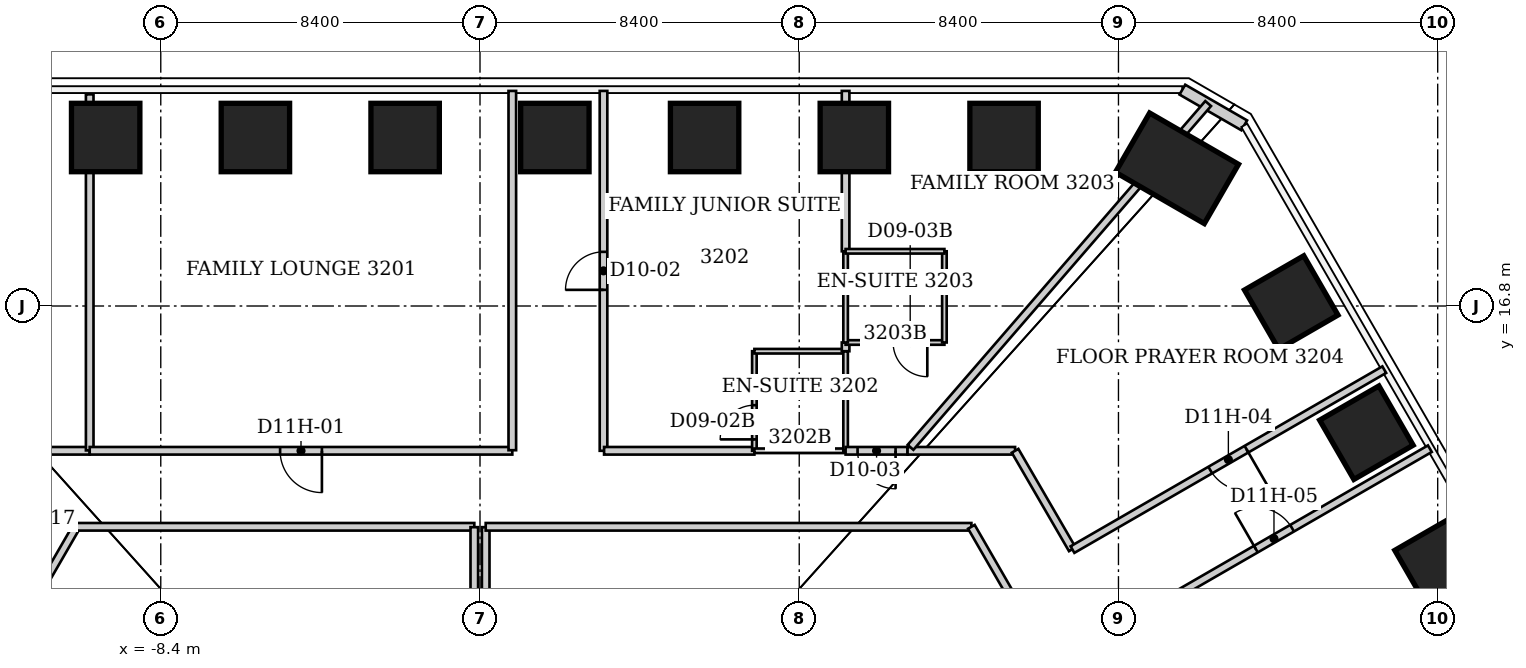
"""IFC4 building model, lengths in metres.
Left out: names, types, materials, properties, quantities, classifications, styles, units other than length and angle.
Written with IfcOpenShell. Run it as: python <this file> out.ifc"""

import sys

from ifc_helpers import new_model, si_unit, direction, frame, frame_2d, origin, origin_2d, place, context, subcontext, project, spatial, rectangle, extrude, element, fill, save


model = new_model("IFC4")
c1 = context("Model", 3, precision=1e-05, world=origin(), true_north=direction((0.0, 1.0)))
c2 = subcontext(c1, "Body", "Model", "MODEL_VIEW")
j1 = project(units=[si_unit("LENGTHUNIT", "METRE"), si_unit("PLANEANGLEUNIT", "RADIAN")], contexts=[c1])
p1 = place(None, origin())
s1 = spatial("IfcSite", under=j1, at=p1, CompositionType="ELEMENT")
p2 = place(p1, origin())
s2 = spatial("IfcBuilding", under=s1, at=p2, CompositionType="ELEMENT")
p3 = place(p2, frame((0.0, 0.0, 131.0)))
s3 = spatial("IfcBuildingStorey", under=s2, at=p3, CompositionType="ELEMENT", Elevation=131.0)
for number, where, z_axis, x_axis in (
    (1, (-9.85, 21.234, 0.0), (0.0, 0.0, 1.0), (0.0, 1.0, 0.0)),
    (2, (-5.91, 21.234, 0.0), (0.0, 0.0, 1.0), (0.0, 1.0, 0.0)),
    (3, (-1.97, 21.234, 0.0), (0.0, 0.0, 1.0), (0.0, 1.0, 0.0)),
    (4, (1.97, 21.234, 0.0), (0.0, 0.0, 1.0), (0.0, 1.0, 0.0)),
    (5, (5.91, 21.234, 0.0), (0.0, 0.0, 1.0), (0.0, 1.0, 0.0)),
    (6, (9.85, 21.234, 0.0), (0.0, 0.0, 1.0), (0.0, 1.0, 0.0)),
    (7, (13.79, 21.234, 0.0), (0.0, 0.0, 1.0), (0.0, 1.0, 0.0)),
):
    element("IfcColumn", number, at=place(p3, frame(where, z_axis=z_axis, x_axis=x_axis)), inside=s3, PredefinedType="COLUMN", context=c2, shape_type="SweptSolid", body=[
        extrude(rectangle(XDim=1.8, YDim=1.8, at=origin_2d()), origin(), (0.0, 0.0, 1.0), 3.8),
    ])
p4 = place(p3, frame((18.339, 20.424, 0.0), z_axis=(0.0, 0.0, 1.0), x_axis=(0.5, 0.866025403784, 0.0)))
e8 = element("IfcColumn", 8, at=p4, inside=s3, PredefinedType="COLUMN", context=c2, shape_type="SweptSolid", body=[
    extrude(rectangle(XDim=1.8, YDim=2.7, at=origin_2d()), origin(), (0.0, 0.0, 1.0), 3.8),
])
for number, where, z_axis, x_axis in (
    (9, (21.346, 16.891, 0.0), (0.0, 0.0, 1.0), (0.866, 0.5, 0.0)),
    (10, (23.324, 13.466, 0.0), (0.0, 0.0, 1.0), (0.866, 0.5, 0.0)),
    (11, (25.302, 10.041, 0.0), (0.0, 0.0, 1.0), (0.866, 0.5, 0.0)),
):
    element("IfcColumn", number, at=place(p3, frame(where, z_axis=z_axis, x_axis=x_axis)), inside=s3, PredefinedType="COLUMN", context=c2, shape_type="SweptSolid", body=[
        extrude(rectangle(XDim=1.8, YDim=1.8, at=origin_2d()), origin(), (0.0, 0.0, 1.0), 3.8),
    ])
p5 = place(p3, frame((18.481, 22.494, 0.0), z_axis=(0.0, 0.0, 1.0), x_axis=(0.865988793993, -0.500063404658, 0.0)))
e12 = element("IfcWall", 12, at=p5, inside=s3, PredefinedType="SOLIDWALL", context=c2, shape_type="SweptSolid", body=[
    extrude(rectangle(XDim=1.88, YDim=0.3, at=frame_2d((0.94, 0.0))), origin(), (0.0, 0.0, 1.0), 3.64),
])
p6 = place(p3, frame((-15.41, 2.7, 0.0), z_axis=(0.0, 0.0, 1.0), x_axis=(0.500296290322, 0.865854272894, 0.0)))
e13 = element("IfcWall", 13, at=p6, inside=s3, PredefinedType="PARTITIONING", context=c2, shape_type="SweptSolid", body=[
    extrude(rectangle(XDim=9.574, YDim=0.2, at=frame_2d((4.787, 0.0))), origin(), (0.0, 0.0, 1.0), 3.64),
])
p7 = place(p3, frame((-10.62, 10.99, 0.0), z_axis=(0.0, 0.0, 1.0), x_axis=(1.0, 0.0, 0.0)))
e14 = element("IfcWall", 14, at=p7, inside=s3, PredefinedType="PARTITIONING", context=c2, shape_type="SweptSolid", body=[
    extrude(rectangle(XDim=10.47, YDim=0.2, at=frame_2d((5.235, 0.0))), origin(), (0.0, 0.0, 1.0), 3.64),
])
p8 = place(p3, frame((-10.27, 12.99, 0.0), z_axis=(0.0, 0.0, 1.0), x_axis=(-1.0, 0.0, 0.0)))
e15 = element("IfcWall", 15, at=p8, inside=s3, PredefinedType="PARTITIONING", context=c2, shape_type="SweptSolid", body=[
    extrude(rectangle(XDim=1.5, YDim=0.2, at=frame_2d((0.75, 0.0))), origin(), (0.0, 0.0, 1.0), 3.64),
])
p9 = place(p3, frame((-10.27, 13.0, 0.0), z_axis=(0.0, 0.0, 1.0), x_axis=(0.0, 1.0, 0.0)))
e16 = element("IfcWall", 16, at=p9, inside=s3, PredefinedType="PARTITIONING", context=c2, shape_type="SweptSolid", body=[
    extrude(rectangle(XDim=9.37, YDim=0.2, at=frame_2d((4.685, 0.0))), origin(), (0.0, 0.0, 1.0), 3.64),
])
for number, where, z_axis, x_axis in (
    (17, (-0.15, 10.98, 0.0), (0.0, 0.0, 1.0), (0.0, -1.0, 0.0)),
    (18, (0.15, 9.21, 0.0), (0.0, 0.0, 1.0), (0.0, 1.0, 0.0)),
):
    element("IfcWall", number, at=place(p3, frame(where, z_axis=z_axis, x_axis=x_axis)), inside=s3, PredefinedType="PARTITIONING", context=c2, shape_type="SweptSolid", body=[
        extrude(rectangle(XDim=1.77, YDim=0.2, at=frame_2d((0.885, 0.0))), origin(), (0.0, 0.0, 1.0), 3.64),
    ])
p10 = place(p3, frame((0.15, 10.99, 0.0), z_axis=(0.0, 0.0, 1.0), x_axis=(1.0, 0.0, 0.0)))
e19 = element("IfcWall", 19, at=p10, inside=s3, PredefinedType="PARTITIONING", context=c2, shape_type="SweptSolid", body=[
    extrude(rectangle(XDim=12.78, YDim=0.2, at=frame_2d((6.39, 0.0))), origin(), (0.0, 0.0, 1.0), 3.64),
])
p11 = place(p3, frame((0.85, 12.99, 0.0), z_axis=(0.0, 0.0, 1.0), x_axis=(-1.0, 0.0, 0.0)))
e20 = element("IfcWall", 20, at=p11, inside=s3, PredefinedType="PARTITIONING", context=c2, shape_type="SweptSolid", body=[
    extrude(rectangle(XDim=11.12, YDim=0.2, at=frame_2d((5.56, 0.0))), origin(), (0.0, 0.0, 1.0), 3.64),
])
p12 = place(p11, frame((5.01, 0.0, 0.0)))
e21 = element("IfcOpeningElement", 21, at=p12, cuts=e20, PredefinedType="OPENING", context=c2, shape_type="SweptSolid", body=[
    extrude(rectangle(XDim=1.1, YDim=2.2, at=frame_2d((0.55, 1.1))), frame((0.0, 0.1, 0.0), z_axis=(0.0, -1.0, 0.0), x_axis=(1.0, 0.0, 0.0)), (0.0, 0.0, 1.0), 0.2),
])
p13 = place(p3, frame((0.85, 22.46, 0.0), z_axis=(0.0, 0.0, 1.0), x_axis=(0.0, -1.0, 0.0)))
e22 = element("IfcWall", 22, at=p13, inside=s3, PredefinedType="PARTITIONING", context=c2, shape_type="SweptSolid", body=[
    extrude(rectangle(XDim=9.455, YDim=0.2, at=frame_2d((4.728, 0.0))), origin(), (0.0, 0.0, 1.0), 3.64),
])
p14 = place(p3, frame((3.25, 12.99, 0.0), z_axis=(0.0, 0.0, 1.0), x_axis=(0.0, 1.0, 0.0)))
e23 = element("IfcWall", 23, at=p14, inside=s3, PredefinedType="PARTITIONING", context=c2, shape_type="SweptSolid", body=[
    extrude(rectangle(XDim=9.47, YDim=0.2, at=frame_2d((4.735, 0.0))), origin(), (0.0, 0.0, 1.0), 3.64),
])
p15 = place(p14, frame((4.235, 0.0, 0.0)))
e24 = element("IfcOpeningElement", 24, at=p15, cuts=e23, PredefinedType="OPENING", context=c2, shape_type="SweptSolid", body=[
    extrude(rectangle(XDim=1.0, YDim=2.13, at=frame_2d((0.5, 1.065))), frame((0.0, 0.1, 0.0), z_axis=(0.0, -1.0, 0.0), x_axis=(1.0, 0.0, 0.0)), (0.0, 0.0, 1.0), 0.2),
])
p16 = place(p3, frame((7.22, 12.99, 0.0), z_axis=(0.0, 0.0, 1.0), x_axis=(-1.0, 0.0, 0.0)))
e25 = element("IfcWall", 25, at=p16, inside=s3, PredefinedType="PARTITIONING", context=c2, shape_type="SweptSolid", body=[
    extrude(rectangle(XDim=3.955, YDim=0.2, at=frame_2d((1.978, 0.0))), origin(), (0.0, 0.0, 1.0), 3.64),
])
p17 = place(p3, frame((7.22, 15.61, 0.0), z_axis=(0.0, 0.0, 1.0), x_axis=(0.0, -1.0, 0.0)))
e26 = element("IfcWall", 26, at=p17, inside=s3, PredefinedType="PARTITIONING", context=c2, shape_type="SweptSolid", body=[
    extrude(rectangle(XDim=2.62, YDim=0.12, at=frame_2d((1.31, 0.0))), origin(), (0.0, 0.0, 1.0), 3.64),
])
p18 = place(p17, frame((1.42, 0.0, 0.0)))
e27 = element("IfcOpeningElement", 27, at=p18, cuts=e26, PredefinedType="OPENING", context=c2, shape_type="SweptSolid", body=[
    extrude(rectangle(XDim=0.9, YDim=2.03, at=frame_2d((0.45, 1.015))), frame((0.0, 0.06, 0.0), z_axis=(0.0, -1.0, 0.0), x_axis=(1.0, 0.0, 0.0)), (0.0, 0.0, 1.0), 0.12),
])
for number, where, z_axis, x_axis in (
    (28, (9.62, 12.99, 0.0), (0.0, 0.0, 1.0), (-1.0, 0.0, 0.0)),
    (29, (9.62, 15.61, 0.0), (0.0, 0.0, 1.0), (-1.0, 0.0, 0.0)),
):
    element("IfcWall", number, at=place(p3, frame(where, z_axis=z_axis, x_axis=x_axis)), inside=s3, PredefinedType="PARTITIONING", context=c2, shape_type="SweptSolid", body=[
        extrude(rectangle(XDim=2.4, YDim=0.12, at=frame_2d((1.2, 0.0))), origin(), (0.0, 0.0, 1.0), 3.64),
    ])
p19 = place(p3, frame((9.62, 15.61, 0.0), z_axis=(0.0, 0.0, 1.0), x_axis=(0.0, -1.0, 0.0)))
e30 = element("IfcWall", 30, at=p19, inside=s3, PredefinedType="PARTITIONING", context=c2, shape_type="SweptSolid", body=[
    extrude(rectangle(XDim=2.62, YDim=0.12, at=frame_2d((1.31, 0.0))), origin(), (0.0, 0.0, 1.0), 3.64),
])
p20 = place(p3, frame((9.62, 15.84, 0.0), z_axis=(0.0, 0.0, 1.0), x_axis=(0.0, -1.0, 0.0)))
e31 = element("IfcWall", 31, at=p20, inside=s3, PredefinedType="PARTITIONING", context=c2, shape_type="SweptSolid", body=[
    extrude(rectangle(XDim=0.23, YDim=0.2, at=frame_2d((0.115, 0.0))), origin(), (0.0, 0.0, 1.0), 3.64),
])
p21 = place(p3, frame((9.62, 15.84, 0.0), z_axis=(0.0, 0.0, 1.0), x_axis=(1.0, 0.0, 0.0)))
e32 = element("IfcWall", 32, at=p21, inside=s3, PredefinedType="PARTITIONING", context=c2, shape_type="SweptSolid", body=[
    extrude(rectangle(XDim=2.6, YDim=0.12, at=frame_2d((1.3, 0.0))), origin(), (0.0, 0.0, 1.0), 3.64),
])
p22 = place(p21, frame((1.25, 0.0, 0.0)))
e33 = element("IfcOpeningElement", 33, at=p22, cuts=e32, PredefinedType="OPENING", context=c2, shape_type="SweptSolid", body=[
    extrude(rectangle(XDim=0.9, YDim=2.03, at=frame_2d((0.45, 1.015))), frame((0.0, 0.06, 0.0), z_axis=(0.0, -1.0, 0.0), x_axis=(1.0, 0.0, 0.0)), (0.0, 0.0, 1.0), 0.12),
])
p23 = place(p3, frame((9.62, 18.24, 0.0), z_axis=(0.0, 0.0, 1.0), x_axis=(0.0, -1.0, 0.0)))
e34 = element("IfcWall", 34, at=p23, inside=s3, PredefinedType="PARTITIONING", context=c2, shape_type="SweptSolid", body=[
    extrude(rectangle(XDim=2.4, YDim=0.12, at=frame_2d((1.2, 0.0))), origin(), (0.0, 0.0, 1.0), 3.64),
])
p24 = place(p3, frame((9.62, 22.46, 0.0), z_axis=(0.0, 0.0, 1.0), x_axis=(0.0, -1.0, 0.0)))
e35 = element("IfcWall", 35, at=p24, inside=s3, PredefinedType="PARTITIONING", context=c2, shape_type="SweptSolid", body=[
    extrude(rectangle(XDim=4.22, YDim=0.2, at=frame_2d((2.11, 0.0))), origin(), (0.0, 0.0, 1.0), 3.64),
])
p25 = place(p3, frame((11.25, 12.99, 0.0), z_axis=(0.0, 0.0, 1.0), x_axis=(-1.0, 0.0, 0.0)))
e36 = element("IfcWall", 36, at=p25, inside=s3, PredefinedType="PARTITIONING", context=c2, shape_type="SweptSolid", body=[
    extrude(rectangle(XDim=1.63, YDim=0.2, at=frame_2d((0.815, 0.0))), origin(), (0.0, 0.0, 1.0), 3.64),
])
p26 = place(p25, frame((0.315, 0.0, 0.0)))
e37 = element("IfcOpeningElement", 37, at=p26, cuts=e36, PredefinedType="OPENING", context=c2, shape_type="SweptSolid", body=[
    extrude(rectangle(XDim=1.0, YDim=2.13, at=frame_2d((0.5, 1.065))), frame((0.0, 0.1, 0.0), z_axis=(0.0, -1.0, 0.0), x_axis=(1.0, 0.0, 0.0)), (0.0, 0.0, 1.0), 0.2),
])
p27 = place(p3, frame((12.22, 15.84, 0.0), z_axis=(0.0, 0.0, 1.0), x_axis=(0.0, 1.0, 0.0)))
e38 = element("IfcWall", 38, at=p27, inside=s3, PredefinedType="PARTITIONING", context=c2, shape_type="SweptSolid", body=[
    extrude(rectangle(XDim=2.4, YDim=0.12, at=frame_2d((1.2, 0.0))), origin(), (0.0, 0.0, 1.0), 3.64),
])
p28 = place(p3, frame((12.22, 18.24, 0.0), z_axis=(0.0, 0.0, 1.0), x_axis=(-1.0, 0.0, 0.0)))
e39 = element("IfcWall", 39, at=p28, inside=s3, PredefinedType="PARTITIONING", context=c2, shape_type="SweptSolid", body=[
    extrude(rectangle(XDim=2.6, YDim=0.12, at=frame_2d((1.3, 0.0))), origin(), (0.0, 0.0, 1.0), 3.64),
])
p29 = place(p3, frame((12.93, 10.99, 0.0), z_axis=(0.0, 0.0, 1.0), x_axis=(0.4998524389, -0.866110581465, 0.0)))
e40 = element("IfcWall", 40, at=p29, inside=s3, PredefinedType="PARTITIONING", context=c2, shape_type="SweptSolid", body=[
    extrude(rectangle(XDim=7.262, YDim=0.2, at=frame_2d((3.631, 0.0))), origin(), (0.0, 0.0, 1.0), 3.64),
])
p30 = place(p3, frame((14.08, 12.99, 0.0), z_axis=(0.0, 0.0, 1.0), x_axis=(-1.0, 0.0, 0.0)))
e41 = element("IfcWall", 41, at=p30, inside=s3, PredefinedType="PARTITIONING", context=c2, shape_type="SweptSolid", body=[
    extrude(rectangle(XDim=2.83, YDim=0.2, at=frame_2d((1.415, 0.0))), origin(), (0.0, 0.0, 1.0), 3.64),
])
p31 = place(p3, frame((15.585, 10.399, 0.0), z_axis=(0.0, 0.0, 1.0), x_axis=(-0.502198411801, 0.864752424214, 0.0)))
e42 = element("IfcWall", 42, at=p31, inside=s3, PredefinedType="PARTITIONING", context=c2, shape_type="SweptSolid", body=[
    extrude(rectangle(XDim=2.997, YDim=0.2, at=frame_2d((1.498, 0.0))), origin(), (0.0, 0.0, 1.0), 3.64),
])
p32 = place(p3, frame((16.79, 8.31, 0.0), z_axis=(0.0, 0.0, 1.0), x_axis=(0.866106622958, 0.499859297871, 0.0)))
e43 = element("IfcWall", 43, at=p32, inside=s3, PredefinedType="PARTITIONING", context=c2, shape_type="SweptSolid", body=[
    extrude(rectangle(XDim=9.472, YDim=0.2, at=frame_2d((4.736, 0.0))), origin(), (0.0, 0.0, 1.0), 3.64),
])
p33 = place(p32, frame((4.186, 0.0, 0.0)))
e44 = element("IfcOpeningElement", 44, at=p33, cuts=e43, PredefinedType="OPENING", context=c2, shape_type="SweptSolid", body=[
    extrude(rectangle(XDim=1.1, YDim=2.2, at=frame_2d((0.55, 1.1))), frame((0.0, 0.1, 0.0), z_axis=(0.0, -1.0, 0.0), x_axis=(1.0, 0.0, 0.0)), (0.0, 0.0, 1.0), 0.2),
])
p34 = place(p3, frame((19.16, 22.127, 0.0), z_axis=(0.0, 0.0, 1.0), x_axis=(-0.654528846076, -0.756037029288, 0.0)))
e45 = element("IfcWall", 45, at=p34, inside=s3, PredefinedType="PARTITIONING", context=c2, shape_type="SweptSolid", body=[
    extrude(rectangle(XDim=11.966, YDim=0.2, at=frame_2d((5.983, 0.0))), origin(), (0.0, 0.0, 1.0), 3.64),
])
p35 = place(p3, frame((23.794, 15.125, 0.0), z_axis=(0.0, 0.0, 1.0), x_axis=(-0.866089024064, -0.499889790249, 0.0)))
e46 = element("IfcWall", 46, at=p35, inside=s3, PredefinedType="PARTITIONING", context=c2, shape_type="SweptSolid", body=[
    extrude(rectangle(XDim=9.472, YDim=0.2, at=frame_2d((4.736, 0.0))), origin(), (0.0, 0.0, 1.0), 3.64),
])
p36 = place(p35, frame((4.186, 0.0, 0.0)))
e47 = element("IfcOpeningElement", 47, at=p36, cuts=e46, PredefinedType="OPENING", context=c2, shape_type="SweptSolid", body=[
    extrude(rectangle(XDim=1.1, YDim=2.2, at=frame_2d((0.55, 1.1))), frame((0.0, 0.1, 0.0), z_axis=(0.0, -1.0, 0.0), x_axis=(1.0, 0.0, 0.0)), (0.0, 0.0, 1.0), 0.2),
])
p37 = place(p12, origin())
e48 = element("IfcDoor", 48, at=p37, inside=s3, OperationType="SINGLE_SWING_LEFT", PredefinedType="DOOR", context=c2, shape_type="SweptSolid", body=[
    extrude(rectangle(XDim=1.1, YDim=2.2, at=frame_2d((0.55, 1.1))), frame((0.0, 0.025, 0.0), z_axis=(0.0, -1.0, 0.0), x_axis=(1.0, 0.0, 0.0)), (0.0, 0.0, 1.0), 0.05),
])
fill(e21, e48)
p38 = place(p15, origin())
e49 = element("IfcDoor", 49, at=p38, inside=s3, OperationType="SINGLE_SWING_LEFT", PredefinedType="DOOR", context=c2, shape_type="SweptSolid", body=[
    extrude(rectangle(XDim=1.0, YDim=2.13, at=frame_2d((0.5, 1.065))), frame((0.0, 0.025, 0.0), z_axis=(0.0, -1.0, 0.0), x_axis=(1.0, 0.0, 0.0)), (0.0, 0.0, 1.0), 0.05),
])
fill(e24, e49)
p39 = place(p18, origin())
e50 = element("IfcDoor", 50, at=p39, inside=s3, OperationType="SINGLE_SWING_RIGHT", PredefinedType="DOOR", context=c2, shape_type="SweptSolid", body=[
    extrude(rectangle(XDim=0.9, YDim=2.03, at=frame_2d((0.45, 1.015))), frame((0.0, 0.025, 0.0), z_axis=(0.0, -1.0, 0.0), x_axis=(1.0, 0.0, 0.0)), (0.0, 0.0, 1.0), 0.05),
])
fill(e27, e50)
p40 = place(p26, origin())
e51 = element("IfcDoor", 51, at=p40, inside=s3, OperationType="SINGLE_SWING_LEFT", PredefinedType="DOOR", context=c2, shape_type="SweptSolid", body=[
    extrude(rectangle(XDim=1.0, YDim=2.13, at=frame_2d((0.5, 1.065))), frame((0.0, 0.025, 0.0), z_axis=(0.0, -1.0, 0.0), x_axis=(1.0, 0.0, 0.0)), (0.0, 0.0, 1.0), 0.05),
])
fill(e37, e51)
p41 = place(p22, origin())
e52 = element("IfcDoor", 52, at=p41, inside=s3, OperationType="SINGLE_SWING_RIGHT", PredefinedType="DOOR", context=c2, shape_type="SweptSolid", body=[
    extrude(rectangle(XDim=0.9, YDim=2.03, at=frame_2d((0.45, 1.015))), frame((0.0, 0.025, 0.0), z_axis=(0.0, -1.0, 0.0), x_axis=(1.0, 0.0, 0.0)), (0.0, 0.0, 1.0), 0.05),
])
fill(e33, e52)
p42 = place(p36, origin())
e53 = element("IfcDoor", 53, at=p42, inside=s3, OperationType="SINGLE_SWING_LEFT", PredefinedType="DOOR", context=c2, shape_type="SweptSolid", body=[
    extrude(rectangle(XDim=1.1, YDim=2.2, at=frame_2d((0.55, 1.1))), frame((0.0, 0.025, 0.0), z_axis=(0.0, -1.0, 0.0), x_axis=(1.0, 0.0, 0.0)), (0.0, 0.0, 1.0), 0.05),
])
fill(e47, e53)
p43 = place(p33, origin())
e54 = element("IfcDoor", 54, at=p43, inside=s3, OperationType="SINGLE_SWING_LEFT", PredefinedType="DOOR", context=c2, shape_type="SweptSolid", body=[
    extrude(rectangle(XDim=1.1, YDim=2.2, at=frame_2d((0.55, 1.1))), frame((0.0, 0.025, 0.0), z_axis=(0.0, -1.0, 0.0), x_axis=(1.0, 0.0, 0.0)), (0.0, 0.0, 1.0), 0.05),
])
fill(e44, e54)
save(model, sys.argv[1])
